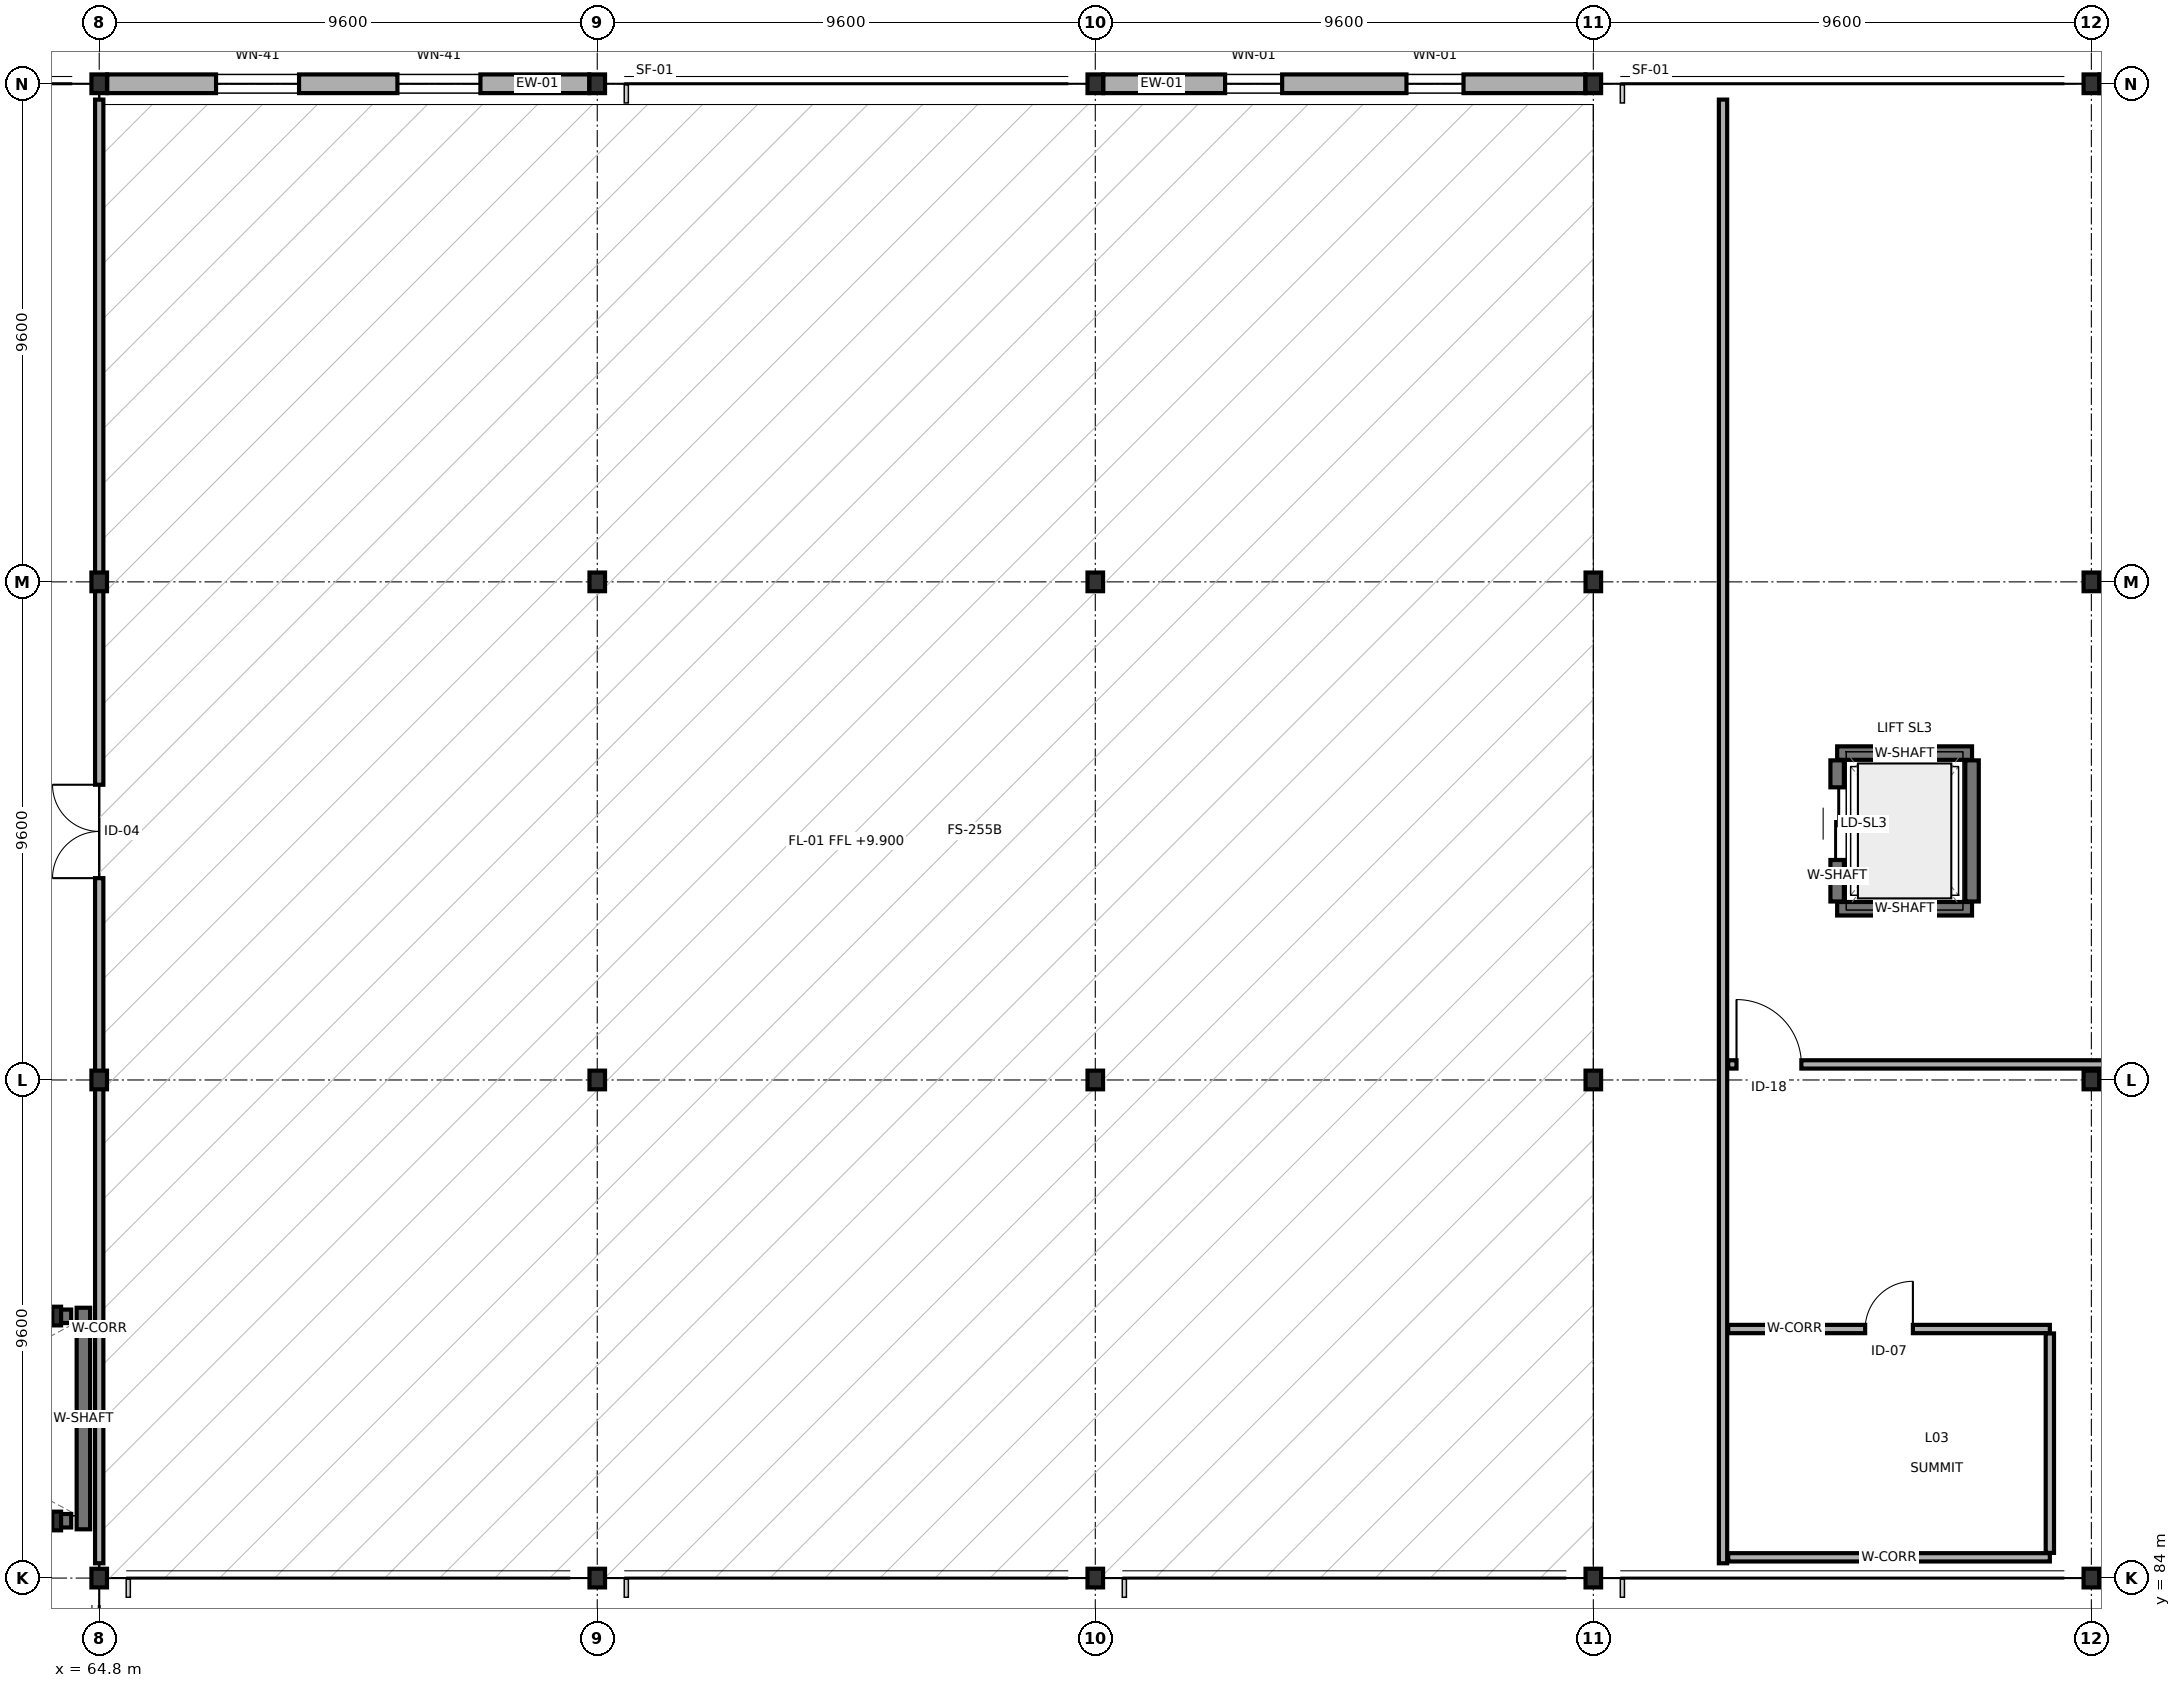
"""IFC4 building model, lengths in metres.
Left out: names, types, materials, properties, quantities, classifications, styles, units other than length and angle.
Written with IfcOpenShell. Run it as: python <this file> out.ifc"""

import sys

from ifc_helpers import new_model, si_unit, direction, frame, frame_2d, origin, origin_2d, place, context, subcontext, project, spatial, rectangle, i_section, extrude, element, fill, save


model = new_model("IFC4")
c1 = context("Model", 3, precision=1e-05, world=origin(), true_north=direction((0.0, 1.0)))
c2 = subcontext(c1, "Body", "Model", "MODEL_VIEW")
j1 = project(units=[si_unit("LENGTHUNIT", "METRE"), si_unit("PLANEANGLEUNIT", "RADIAN")], contexts=[c1])
p1 = place(None, origin())
s1 = spatial("IfcSite", under=j1, at=p1, CompositionType="ELEMENT")
p2 = place(p1, origin())
s2 = spatial("IfcBuilding", under=s1, at=p2, CompositionType="ELEMENT")
p3 = place(p2, frame((0.0, 0.0, 9.9)))
s3 = spatial("IfcBuildingStorey", under=s2, at=p3, CompositionType="ELEMENT", Elevation=9.9)
for number, where, z_axis, x_axis in (
    (1, (64.8, 84.0, 0.0), (0.0, 0.0, 1.0), (1.0, 0.0, 0.0)),
    (2, (64.8, 93.6, 0.0), (0.0, 0.0, 1.0), (1.0, 0.0, 0.0)),
    (3, (64.8, 103.2, 0.0), (0.0, 0.0, 1.0), (1.0, 0.0, 0.0)),
    (4, (64.8, 112.8, 0.0), (0.0, 0.0, 1.0), (1.0, 0.0, 0.0)),
    (5, (74.4, 84.0, 0.0), (0.0, 0.0, 1.0), (1.0, 0.0, 0.0)),
    (6, (74.4, 93.6, 0.0), (0.0, 0.0, 1.0), (1.0, 0.0, 0.0)),
    (7, (74.4, 103.2, 0.0), (0.0, 0.0, 1.0), (1.0, 0.0, 0.0)),
    (8, (74.4, 112.8, 0.0), (0.0, 0.0, 1.0), (1.0, 0.0, 0.0)),
    (9, (84.0, 84.0, 0.0), (0.0, 0.0, 1.0), (1.0, 0.0, 0.0)),
    (10, (84.0, 93.6, 0.0), (0.0, 0.0, 1.0), (1.0, 0.0, 0.0)),
    (11, (84.0, 103.2, 0.0), (0.0, 0.0, 1.0), (1.0, 0.0, 0.0)),
    (12, (84.0, 112.8, 0.0), (0.0, 0.0, 1.0), (1.0, 0.0, 0.0)),
    (13, (93.6, 84.0, 0.0), (0.0, 0.0, 1.0), (1.0, 0.0, 0.0)),
    (14, (93.6, 93.6, 0.0), (0.0, 0.0, 1.0), (1.0, 0.0, 0.0)),
    (15, (93.6, 103.2, 0.0), (0.0, 0.0, 1.0), (1.0, 0.0, 0.0)),
    (16, (93.6, 112.8, 0.0), (0.0, 0.0, 1.0), (1.0, 0.0, 0.0)),
    (17, (103.2, 84.0, 0.0), (0.0, 0.0, 1.0), (1.0, 0.0, 0.0)),
    (18, (103.2, 93.6, 0.0), (0.0, 0.0, 1.0), (1.0, 0.0, 0.0)),
    (19, (103.2, 103.2, 0.0), (0.0, 0.0, 1.0), (1.0, 0.0, 0.0)),
    (20, (103.2, 112.8, 0.0), (0.0, 0.0, 1.0), (1.0, 0.0, 0.0)),
):
    element("IfcColumn", number, at=place(p3, frame(where, z_axis=z_axis, x_axis=x_axis)), inside=s3, PredefinedType="COLUMN", context=c2, shape_type="SweptSolid", body=[
        extrude(i_section(OverallWidth=0.3, OverallDepth=0.36, WebThickness=0.012, FlangeThickness=0.022, FilletRadius=0.027, at=origin_2d()), origin(), (0.0, 0.0, 1.0), 4.8),
    ])
for number, where, z_axis, x_axis in (
    (21, (63.98, 85.1, 0.0), (0.0, 0.0, 1.0), (1.0, 0.0, 0.0)),
    (22, (63.98, 89.05, 0.0), (0.0, 0.0, 1.0), (1.0, 0.0, 0.0)),
):
    element("IfcColumn", number, at=place(p3, frame(where, z_axis=z_axis, x_axis=x_axis)), inside=s3, PredefinedType="PILASTER", context=c2, shape_type="SweptSolid", body=[
        extrude(i_section(OverallWidth=0.17, OverallDepth=0.36, WebThickness=0.008, FlangeThickness=0.013, FilletRadius=0.018, at=origin_2d()), origin(), (0.0, 0.0, 1.0), 4.8),
    ])
p4 = place(p3, frame((64.954, 112.8, 0.0), z_axis=(0.0, 0.0, 1.0), x_axis=(1.0, 0.0, 0.0)))
e23 = element("IfcWall", 23, at=p4, inside=s3, PredefinedType="SOLIDWALL", context=c2, shape_type="SweptSolid", body=[
    extrude(rectangle(XDim=9.292, YDim=0.36, at=frame_2d((4.646, 0.0))), origin(), (0.0, 0.0, 1.0), 4.025),
])
p5 = place(p4, frame((2.098, 0.0, 0.75)))
e24 = element("IfcOpeningElement", 24, at=p5, cuts=e23, PredefinedType="OPENING", context=c2, shape_type="SweptSolid", body=[
    extrude(rectangle(XDim=1.6, YDim=2.4, at=frame_2d((0.8, 1.2))), frame((0.0, 0.19, 0.0), z_axis=(0.0, -1.0, 0.0), x_axis=(1.0, 0.0, 0.0)), (0.0, 0.0, 1.0), 0.38),
])
p6 = place(p4, frame((5.594, 0.0, 0.75)))
e25 = element("IfcOpeningElement", 25, at=p6, cuts=e23, PredefinedType="OPENING", context=c2, shape_type="SweptSolid", body=[
    extrude(rectangle(XDim=1.6, YDim=2.4, at=frame_2d((0.8, 1.2))), frame((0.0, 0.19, 0.0), z_axis=(0.0, -1.0, 0.0), x_axis=(1.0, 0.0, 0.0)), (0.0, 0.0, 1.0), 0.38),
])
p7 = place(p3, frame((84.154, 112.8, 0.0), z_axis=(0.0, 0.0, 1.0), x_axis=(1.0, 0.0, 0.0)))
e26 = element("IfcWall", 26, at=p7, inside=s3, PredefinedType="SOLIDWALL", context=c2, shape_type="SweptSolid", body=[
    extrude(rectangle(XDim=9.292, YDim=0.36, at=frame_2d((4.646, 0.0))), origin(), (0.0, 0.0, 1.0), 4.025),
])
p8 = place(p7, frame((2.348, 0.0, 0.75)))
e27 = element("IfcOpeningElement", 27, at=p8, cuts=e26, PredefinedType="OPENING", context=c2, shape_type="SweptSolid", body=[
    extrude(rectangle(XDim=1.1, YDim=1.4, at=frame_2d((0.55, 0.7))), frame((0.0, 0.19, 0.0), z_axis=(0.0, -1.0, 0.0), x_axis=(1.0, 0.0, 0.0)), (0.0, 0.0, 1.0), 0.38),
])
p9 = place(p7, frame((5.844, 0.0, 0.75)))
e28 = element("IfcOpeningElement", 28, at=p9, cuts=e26, PredefinedType="OPENING", context=c2, shape_type="SweptSolid", body=[
    extrude(rectangle(XDim=1.1, YDim=1.4, at=frame_2d((0.55, 0.7))), frame((0.0, 0.19, 0.0), z_axis=(0.0, -1.0, 0.0), x_axis=(1.0, 0.0, 0.0)), (0.0, 0.0, 1.0), 0.38),
])
p10 = place(p3, frame((103.354, 112.8, 0.0), z_axis=(0.0, 0.0, 1.0), x_axis=(1.0, 0.0, 0.0)))
e29 = element("IfcWall", 29, at=p10, inside=s3, PredefinedType="SOLIDWALL", context=c2, shape_type="SweptSolid", body=[
    extrude(rectangle(XDim=4.492, YDim=0.36, at=frame_2d((2.246, 0.0))), origin(), (0.0, 0.0, 1.0), 4.025),
])
p11 = place(p3, frame((64.495, 84.94, 0.0), z_axis=(0.0, 0.0, 1.0), x_axis=(0.0, 1.0, 0.0)))
e30 = element("IfcWall", 30, at=p11, inside=s3, PredefinedType="SHEAR", context=c2, shape_type="SweptSolid", body=[
    extrude(rectangle(XDim=4.27, YDim=0.26, at=frame_2d((2.135, 0.0))), origin(), (0.0, 0.0, 1.0), 4.54),
])
p12 = place(p3, frame((55.74, 85.105, 0.0), z_axis=(0.0, 0.0, 1.0), x_axis=(1.0, 0.0, 0.0)))
e31 = element("IfcWall", 31, at=p12, inside=s3, PredefinedType="SHEAR", context=c2, shape_type="SweptSolid", body=[
    extrude(rectangle(XDim=8.52, YDim=0.26, at=frame_2d((4.26, 0.0))), origin(), (0.0, 0.0, 1.0), 4.54),
])
p13 = place(p12, frame((0.45, 0.0, 0.0)))
e32 = element("IfcOpeningElement", 32, at=p13, cuts=e31, PredefinedType="OPENING", context=c2, shape_type="SweptSolid", body=[
    extrude(rectangle(XDim=1.1, YDim=2.2, at=frame_2d((0.55, 1.1))), frame((0.0, 0.14, 0.0), z_axis=(0.0, -1.0, 0.0), x_axis=(1.0, 0.0, 0.0)), (0.0, 0.0, 1.0), 0.28),
])
p14 = place(p3, frame((55.74, 89.045, 0.0), z_axis=(0.0, 0.0, 1.0), x_axis=(1.0, 0.0, 0.0)))
e33 = element("IfcWall", 33, at=p14, inside=s3, PredefinedType="SHEAR", context=c2, shape_type="SweptSolid", body=[
    extrude(rectangle(XDim=8.52, YDim=0.26, at=frame_2d((4.26, 0.0))), origin(), (0.0, 0.0, 1.0), 4.54),
])
for number, where, z_axis, x_axis in (
    (34, (98.3, 96.9, 0.0), (0.0, 0.0, 1.0), (1.0, 0.0, 0.0)),
    (35, (98.3, 99.9, 0.0), (0.0, 0.0, 1.0), (1.0, 0.0, 0.0)),
):
    element("IfcWall", number, at=place(p3, frame(where, z_axis=z_axis, x_axis=x_axis)), inside=s3, PredefinedType="SHEAR", context=c2, shape_type="SweptSolid", body=[
        extrude(rectangle(XDim=2.6, YDim=0.26, at=frame_2d((1.3, 0.0))), origin(), (0.0, 0.0, 1.0), 4.54),
    ])
p15 = place(p3, frame((98.3, 97.04, 0.0), z_axis=(0.0, 0.0, 1.0), x_axis=(0.0, 1.0, 0.0)))
e36 = element("IfcWall", 36, at=p15, inside=s3, PredefinedType="SHEAR", context=c2, shape_type="SweptSolid", body=[
    extrude(rectangle(XDim=2.72, YDim=0.26, at=frame_2d((1.36, 0.0))), origin(), (0.0, 0.0, 1.0), 4.54),
])
p16 = place(p15, frame((0.8, 0.0, 0.0)))
e37 = element("IfcOpeningElement", 37, at=p16, cuts=e36, PredefinedType="OPENING", context=c2, shape_type="SweptSolid", body=[
    extrude(rectangle(XDim=1.4, YDim=2.3, at=frame_2d((0.7, 1.15))), frame((0.0, 0.14, 0.0), z_axis=(0.0, -1.0, 0.0), x_axis=(1.0, 0.0, 0.0)), (0.0, 0.0, 1.0), 0.28),
])
p17 = place(p3, frame((100.9, 97.04, 0.0), z_axis=(0.0, 0.0, 1.0), x_axis=(0.0, 1.0, 0.0)))
e38 = element("IfcWall", 38, at=p17, inside=s3, PredefinedType="SHEAR", context=c2, shape_type="SweptSolid", body=[
    extrude(rectangle(XDim=2.72, YDim=0.26, at=frame_2d((1.36, 0.0))), origin(), (0.0, 0.0, 1.0), 4.54),
])
p18 = place(p3, frame((64.8, 84.285, 0.0), z_axis=(0.0, 0.0, 1.0), x_axis=(0.0, 1.0, 0.0)))
e39 = element("IfcWall", 39, at=p18, inside=s3, PredefinedType="PARTITIONING", context=c2, shape_type="SweptSolid", body=[
    extrude(rectangle(XDim=28.21, YDim=0.16, at=frame_2d((14.105, 0.0))), origin(), (0.0, 0.0, 1.0), 4.025),
])
p19 = place(p18, frame((13.205, 0.0, 0.0)))
e40 = element("IfcOpeningElement", 40, at=p19, cuts=e39, PredefinedType="OPENING", context=c2, shape_type="SweptSolid", body=[
    extrude(rectangle(XDim=1.8, YDim=2.3, at=frame_2d((0.9, 1.15))), frame((0.0, 0.09, 0.0), z_axis=(0.0, -1.0, 0.0), x_axis=(1.0, 0.0, 0.0)), (0.0, 0.0, 1.0), 0.18),
])
p20 = place(p3, frame((96.1, 84.285, 0.0), z_axis=(0.0, 0.0, 1.0), x_axis=(0.0, 1.0, 0.0)))
e41 = element("IfcWall", 41, at=p20, inside=s3, PredefinedType="PARTITIONING", context=c2, shape_type="SweptSolid", body=[
    extrude(rectangle(XDim=28.21, YDim=0.16, at=frame_2d((14.105, 0.0))), origin(), (0.0, 0.0, 1.0), 4.085),
])
p21 = place(p3, frame((96.2, 93.9, 0.0), z_axis=(0.0, 0.0, 1.0), x_axis=(1.0, 0.0, 0.0)))
e42 = element("IfcWall", 42, at=p21, inside=s3, PredefinedType="PARTITIONING", context=c2, shape_type="SweptSolid", body=[
    extrude(rectangle(XDim=21.2, YDim=0.16, at=frame_2d((10.6, 0.0))), origin(), (0.0, 0.0, 1.0), 4.025),
])
p22 = place(p21, frame((0.16, 0.0, 0.0)))
e43 = element("IfcOpeningElement", 43, at=p22, cuts=e42, PredefinedType="OPENING", context=c2, shape_type="SweptSolid", body=[
    extrude(rectangle(XDim=1.25, YDim=2.22, at=frame_2d((0.625, 1.11))), frame((0.0, 0.09, 0.0), z_axis=(0.0, -1.0, 0.0), x_axis=(1.0, 0.0, 0.0)), (0.0, 0.0, 1.0), 0.18),
])
p23 = place(p3, frame((96.2, 84.4, 0.0), z_axis=(0.0, 0.0, 1.0), x_axis=(1.0, 0.0, 0.0)))
e44 = element("IfcWall", 44, at=p23, inside=s3, PredefinedType="PARTITIONING", context=c2, shape_type="SweptSolid", body=[
    extrude(rectangle(XDim=6.2, YDim=0.16, at=frame_2d((3.1, 0.0))), origin(), (0.0, 0.0, 1.0), 4.54),
])
p24 = place(p3, frame((96.2, 88.8, 0.0), z_axis=(0.0, 0.0, 1.0), x_axis=(1.0, 0.0, 0.0)))
e45 = element("IfcWall", 45, at=p24, inside=s3, PredefinedType="PARTITIONING", context=c2, shape_type="SweptSolid", body=[
    extrude(rectangle(XDim=6.2, YDim=0.16, at=frame_2d((3.1, 0.0))), origin(), (0.0, 0.0, 1.0), 4.54),
])
p25 = place(p24, frame((2.64, 0.0, 0.0)))
e46 = element("IfcOpeningElement", 46, at=p25, cuts=e45, PredefinedType="OPENING", context=c2, shape_type="SweptSolid", body=[
    extrude(rectangle(XDim=0.92, YDim=2.1, at=frame_2d((0.46, 1.05))), frame((0.0, 0.09, 0.0), z_axis=(0.0, -1.0, 0.0), x_axis=(1.0, 0.0, 0.0)), (0.0, 0.0, 1.0), 0.18),
])
p26 = place(p3, frame((102.4, 84.485, 0.0), z_axis=(0.0, 0.0, 1.0), x_axis=(0.0, 1.0, 0.0)))
e47 = element("IfcWall", 47, at=p26, inside=s3, PredefinedType="PARTITIONING", context=c2, shape_type="SweptSolid", body=[
    extrude(rectangle(XDim=4.23, YDim=0.16, at=frame_2d((2.115, 0.0))), origin(), (0.0, 0.0, 1.0), 4.54),
])
p27 = place(p5, origin())
e48 = element("IfcWindow", 48, at=p27, inside=s3, PartitioningType="SINGLE_PANEL", PredefinedType="WINDOW", context=c2, shape_type="SweptSolid", body=[
    extrude(rectangle(XDim=1.6, YDim=2.4, at=frame_2d((0.8, 1.2))), frame((0.0, 0.03, 0.0), z_axis=(0.0, -1.0, 0.0), x_axis=(1.0, 0.0, 0.0)), (0.0, 0.0, 1.0), 0.06),
])
fill(e24, e48)
p28 = place(p6, origin())
e49 = element("IfcWindow", 49, at=p28, inside=s3, PartitioningType="SINGLE_PANEL", PredefinedType="WINDOW", context=c2, shape_type="SweptSolid", body=[
    extrude(rectangle(XDim=1.6, YDim=2.4, at=frame_2d((0.8, 1.2))), frame((0.0, 0.03, 0.0), z_axis=(0.0, -1.0, 0.0), x_axis=(1.0, 0.0, 0.0)), (0.0, 0.0, 1.0), 0.06),
])
fill(e25, e49)
p29 = place(p8, origin())
e50 = element("IfcWindow", 50, at=p29, inside=s3, PartitioningType="SINGLE_PANEL", PredefinedType="WINDOW", context=c2, shape_type="SweptSolid", body=[
    extrude(rectangle(XDim=1.1, YDim=1.4, at=frame_2d((0.55, 0.7))), frame((0.0, 0.03, 0.0), z_axis=(0.0, -1.0, 0.0), x_axis=(1.0, 0.0, 0.0)), (0.0, 0.0, 1.0), 0.06),
])
fill(e27, e50)
p30 = place(p9, origin())
e51 = element("IfcWindow", 51, at=p30, inside=s3, PartitioningType="SINGLE_PANEL", PredefinedType="WINDOW", context=c2, shape_type="SweptSolid", body=[
    extrude(rectangle(XDim=1.1, YDim=1.4, at=frame_2d((0.55, 0.7))), frame((0.0, 0.03, 0.0), z_axis=(0.0, -1.0, 0.0), x_axis=(1.0, 0.0, 0.0)), (0.0, 0.0, 1.0), 0.06),
])
fill(e28, e51)
p31 = place(p16, origin())
e52 = element("IfcDoor", 52, at=p31, inside=s3, OperationType="SLIDING_TO_LEFT", PredefinedType="DOOR", context=c2, shape_type="SweptSolid", body=[
    extrude(rectangle(XDim=1.4, YDim=2.3, at=frame_2d((0.7, 1.15))), frame((0.0, 0.025, 0.0), z_axis=(0.0, -1.0, 0.0), x_axis=(1.0, 0.0, 0.0)), (0.0, 0.0, 1.0), 0.05),
])
fill(e37, e52)
p32 = place(p19, origin())
e53 = element("IfcDoor", 53, at=p32, inside=s3, OperationType="DOUBLE_DOOR_SINGLE_SWING", PredefinedType="DOOR", context=c2, shape_type="SweptSolid", body=[
    extrude(rectangle(XDim=1.8, YDim=2.3, at=frame_2d((0.9, 1.15))), frame((0.0, 0.025, 0.0), z_axis=(0.0, -1.0, 0.0), x_axis=(1.0, 0.0, 0.0)), (0.0, 0.0, 1.0), 0.05),
])
fill(e40, e53)
p33 = place(p22, origin())
e54 = element("IfcDoor", 54, at=p33, inside=s3, OperationType="SINGLE_SWING_LEFT", PredefinedType="DOOR", context=c2, shape_type="SweptSolid", body=[
    extrude(rectangle(XDim=1.25, YDim=2.22, at=frame_2d((0.625, 1.11))), frame((0.0, 0.025, 0.0), z_axis=(0.0, -1.0, 0.0), x_axis=(1.0, 0.0, 0.0)), (0.0, 0.0, 1.0), 0.05),
])
fill(e43, e54)
p34 = place(p25, origin())
e55 = element("IfcDoor", 55, at=p34, inside=s3, OperationType="SINGLE_SWING_RIGHT", PredefinedType="DOOR", context=c2, shape_type="SweptSolid", body=[
    extrude(rectangle(XDim=0.92, YDim=2.1, at=frame_2d((0.46, 1.05))), frame((0.0, 0.025, 0.0), z_axis=(0.0, -1.0, 0.0), x_axis=(1.0, 0.0, 0.0)), (0.0, 0.0, 1.0), 0.05),
])
fill(e46, e55)
save(model, sys.argv[1])
